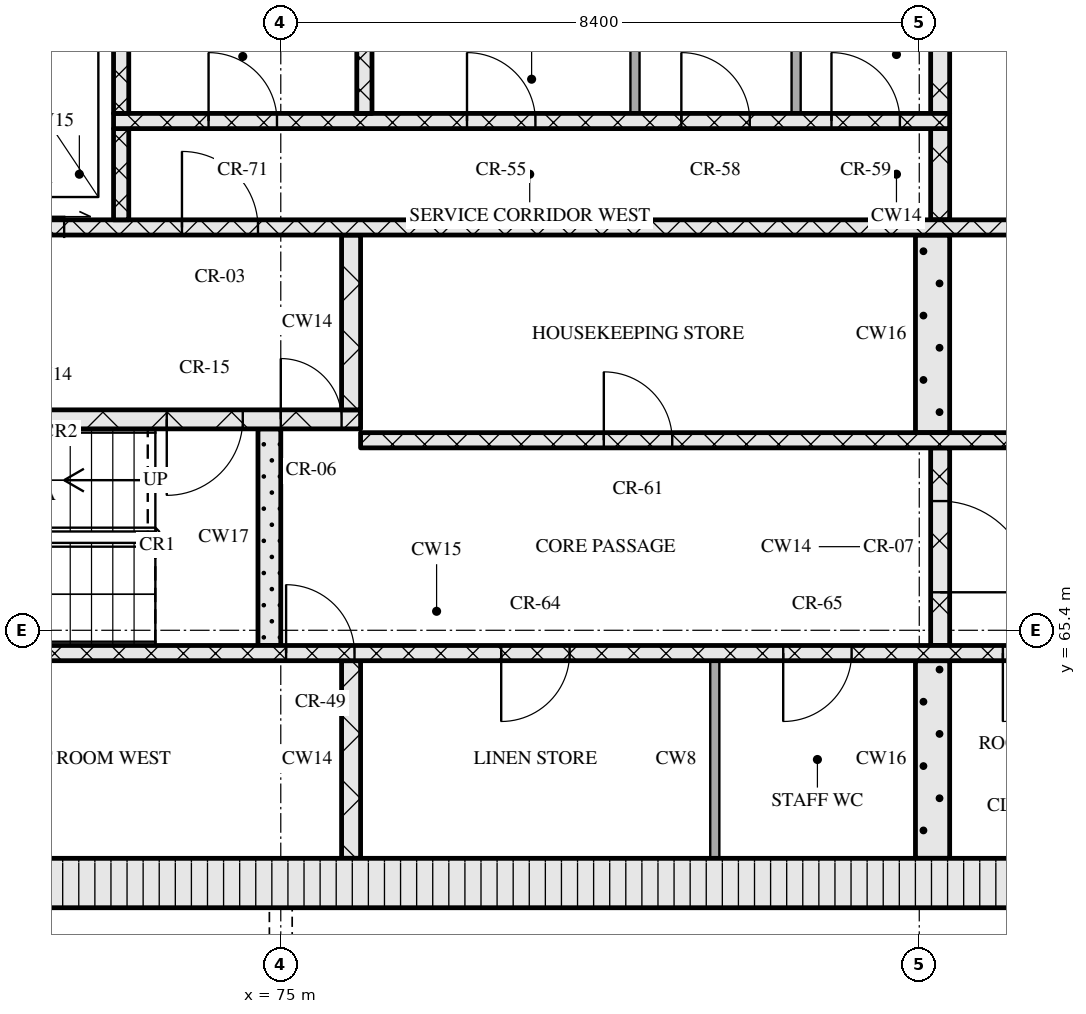
"""IFC4 building model, lengths in metres.
Left out: names, types, materials, properties, quantities, classifications, styles, units other than length and angle.
Written with IfcOpenShell. Run it as: python <this file> out.ifc"""

import sys

from ifc_helpers import new_model, si_unit, direction, frame, frame_2d, origin, place, context, subcontext, project, spatial, rectangle, extrude, element, fill, save


model = new_model("IFC4")
c1 = context("Model", 3, precision=1e-05, world=origin(), true_north=direction((0.0, 1.0)))
c2 = subcontext(c1, "Body", "Model", "MODEL_VIEW")
j1 = project(units=[si_unit("LENGTHUNIT", "METRE"), si_unit("PLANEANGLEUNIT", "RADIAN")], contexts=[c1])
p1 = place(None, origin())
s1 = spatial("IfcSite", under=j1, at=p1, CompositionType="ELEMENT")
p2 = place(p1, origin())
s2 = spatial("IfcBuilding", under=s1, at=p2, CompositionType="ELEMENT")
p3 = place(p2, frame((0.0, 0.0, 219.9)))
s3 = spatial("IfcBuildingStorey", under=s2, at=p3, CompositionType="ELEMENT", Elevation=219.9)
p4 = place(p3, frame((67.15, 62.075, 0.0), z_axis=(0.0, 0.0, 1.0), x_axis=(1.0, 0.0, 0.0)))
e1 = element("IfcWall", 1, at=p4, inside=s3, PredefinedType="SOLIDWALL", context=c2, shape_type="SweptSolid", body=[
    extrude(rectangle(XDim=40.9, YDim=0.65, at=frame_2d((20.45, 0.0))), origin(), (0.0, 0.0, 1.0), 3.32),
])
p5 = place(p4, frame((20.8, 0.0, 0.0)))
e2 = element("IfcOpeningElement", 2, at=p5, cuts=e1, PredefinedType="OPENING", context=c2, shape_type="SweptSolid", body=[
    extrude(rectangle(XDim=1.8, YDim=2.1, at=frame_2d((0.9, 1.05))), frame((0.0, 0.335, 0.0), z_axis=(0.0, -1.0, 0.0), x_axis=(1.0, 0.0, 0.0)), (0.0, 0.0, 1.0), 0.67),
])
p6 = place(p3, frame((75.925, 62.4, 0.0), z_axis=(0.0, 0.0, 1.0), x_axis=(0.0, 1.0, 0.0)))
e3 = element("IfcWall", 3, at=p6, inside=s3, PredefinedType="SOLIDWALL", context=c2, shape_type="SweptSolid", body=[
    extrude(rectangle(XDim=2.6, YDim=0.25, at=frame_2d((1.3, 0.0))), origin(), (0.0, 0.0, 1.0), 3.32),
])
p7 = place(p3, frame((80.71, 62.4, 0.0), z_axis=(0.0, 0.0, 1.0), x_axis=(0.0, 1.0, 0.0)))
e4 = element("IfcWall", 4, at=p7, inside=s3, PredefinedType="PARTITIONING", context=c2, shape_type="SweptSolid", body=[
    extrude(rectangle(XDim=2.6, YDim=0.12, at=frame_2d((1.3, 0.0))), origin(), (0.0, 0.0, 1.0), 3.32),
])
p8 = place(p3, frame((83.575, 62.4, 0.0), z_axis=(0.0, 0.0, 1.0), x_axis=(0.0, 1.0, 0.0)))
e5 = element("IfcWall", 5, at=p8, inside=s3, PredefinedType="SOLIDWALL", context=c2, shape_type="SweptSolid", body=[
    extrude(rectangle(XDim=2.6, YDim=0.45, at=frame_2d((1.3, 0.0))), origin(), (0.0, 0.0, 1.0), 3.32),
])
p9 = place(p3, frame((67.8, 65.1, 0.0), z_axis=(0.0, 0.0, 1.0), x_axis=(1.0, 0.0, 0.0)))
e6 = element("IfcWall", 6, at=p9, inside=s3, PredefinedType="SOLIDWALL", context=c2, shape_type="SweptSolid", body=[
    extrude(rectangle(XDim=18.5, YDim=0.2, at=frame_2d((9.25, 0.0))), origin(), (0.0, 0.0, 1.0), 3.32),
])
p10 = place(p9, frame((7.27, 0.0, 0.0)))
e7 = element("IfcOpeningElement", 7, at=p10, cuts=e6, PredefinedType="OPENING", context=c2, shape_type="SweptSolid", body=[
    extrude(rectangle(XDim=0.9, YDim=2.1, at=frame_2d((0.45, 1.05))), frame((0.0, 0.11, 0.0), z_axis=(0.0, -1.0, 0.0), x_axis=(1.0, 0.0, 0.0)), (0.0, 0.0, 1.0), 0.22),
])
p11 = place(p9, frame((10.1, 0.0, 0.0)))
e8 = element("IfcOpeningElement", 8, at=p11, cuts=e6, PredefinedType="OPENING", context=c2, shape_type="SweptSolid", body=[
    extrude(rectangle(XDim=0.9, YDim=2.1, at=frame_2d((0.45, 1.05))), frame((0.0, 0.11, 0.0), z_axis=(0.0, -1.0, 0.0), x_axis=(1.0, 0.0, 0.0)), (0.0, 0.0, 1.0), 0.22),
])
p12 = place(p9, frame((13.81, 0.0, 0.0)))
e9 = element("IfcOpeningElement", 9, at=p12, cuts=e6, PredefinedType="OPENING", context=c2, shape_type="SweptSolid", body=[
    extrude(rectangle(XDim=0.9, YDim=2.1, at=frame_2d((0.45, 1.05))), frame((0.0, 0.11, 0.0), z_axis=(0.0, -1.0, 0.0), x_axis=(1.0, 0.0, 0.0)), (0.0, 0.0, 1.0), 0.22),
])
p13 = place(p9, frame((16.7, 0.0, 0.0)))
e10 = element("IfcOpeningElement", 10, at=p13, cuts=e6, PredefinedType="OPENING", context=c2, shape_type="SweptSolid", body=[
    extrude(rectangle(XDim=0.9, YDim=2.1, at=frame_2d((0.45, 1.05))), frame((0.0, 0.11, 0.0), z_axis=(0.0, -1.0, 0.0), x_axis=(1.0, 0.0, 0.0)), (0.0, 0.0, 1.0), 0.22),
])
p14 = place(p3, frame((74.85, 65.2, 0.0), z_axis=(0.0, 0.0, 1.0), x_axis=(0.0, 1.0, 0.0)))
e11 = element("IfcWall", 11, at=p14, inside=s3, PredefinedType="SOLIDWALL", context=c2, shape_type="SweptSolid", body=[
    extrude(rectangle(XDim=2.85, YDim=0.3, at=frame_2d((1.425, 0.0))), origin(), (0.0, 0.0, 1.0), 3.32),
])
p15 = place(p3, frame((83.675, 65.2, 0.0), z_axis=(0.0, 0.0, 1.0), x_axis=(0.0, 1.0, 0.0)))
e12 = element("IfcWall", 12, at=p15, inside=s3, PredefinedType="SOLIDWALL", context=c2, shape_type="SweptSolid", body=[
    extrude(rectangle(XDim=2.6, YDim=0.25, at=frame_2d((1.3, 0.0))), origin(), (0.0, 0.0, 1.0), 3.32),
])
p16 = place(p15, frame((0.7, 0.0, 0.0)))
e13 = element("IfcOpeningElement", 13, at=p16, cuts=e12, PredefinedType="OPENING", context=c2, shape_type="SweptSolid", body=[
    extrude(rectangle(XDim=1.2, YDim=2.1, at=frame_2d((0.6, 1.05))), frame((0.0, 0.135, 0.0), z_axis=(0.0, -1.0, 0.0), x_axis=(1.0, 0.0, 0.0)), (0.0, 0.0, 1.0), 0.27),
])
p17 = place(p3, frame((76.05, 67.9, 0.0), z_axis=(0.0, 0.0, 1.0), x_axis=(1.0, 0.0, 0.0)))
e14 = element("IfcWall", 14, at=p17, inside=s3, PredefinedType="SOLIDWALL", context=c2, shape_type="SweptSolid", body=[
    extrude(rectangle(XDim=23.1, YDim=0.2, at=frame_2d((11.55, 0.0))), origin(), (0.0, 0.0, 1.0), 3.32),
])
p18 = place(p17, frame((3.2, 0.0, 0.0)))
e15 = element("IfcOpeningElement", 15, at=p18, cuts=e14, PredefinedType="OPENING", context=c2, shape_type="SweptSolid", body=[
    extrude(rectangle(XDim=0.9, YDim=2.1, at=frame_2d((0.45, 1.05))), frame((0.0, 0.11, 0.0), z_axis=(0.0, -1.0, 0.0), x_axis=(1.0, 0.0, 0.0)), (0.0, 0.0, 1.0), 0.22),
])
p19 = place(p17, frame((9.7, 0.0, 0.0)))
e16 = element("IfcOpeningElement", 16, at=p19, cuts=e14, PredefinedType="OPENING", context=c2, shape_type="SweptSolid", body=[
    extrude(rectangle(XDim=0.9, YDim=2.1, at=frame_2d((0.45, 1.05))), frame((0.0, 0.11, 0.0), z_axis=(0.0, -1.0, 0.0), x_axis=(1.0, 0.0, 0.0)), (0.0, 0.0, 1.0), 0.22),
])
p20 = place(p17, frame((13.55, 0.0, 0.0)))
e17 = element("IfcOpeningElement", 17, at=p20, cuts=e14, PredefinedType="OPENING", context=c2, shape_type="SweptSolid", body=[
    extrude(rectangle(XDim=1.0, YDim=2.1, at=frame_2d((0.5, 1.05))), frame((0.0, 0.11, 0.0), z_axis=(0.0, -1.0, 0.0), x_axis=(1.0, 0.0, 0.0)), (0.0, 0.0, 1.0), 0.22),
])
p21 = place(p17, frame((16.2, 0.0, 0.0)))
e18 = element("IfcOpeningElement", 18, at=p21, cuts=e14, PredefinedType="OPENING", context=c2, shape_type="SweptSolid", body=[
    extrude(rectangle(XDim=1.1, YDim=2.1, at=frame_2d((0.55, 1.05))), frame((0.0, 0.11, 0.0), z_axis=(0.0, -1.0, 0.0), x_axis=(1.0, 0.0, 0.0)), (0.0, 0.0, 1.0), 0.22),
])
p22 = place(p17, frame((18.7, 0.0, 0.0)))
e19 = element("IfcOpeningElement", 19, at=p22, cuts=e14, PredefinedType="OPENING", context=c2, shape_type="SweptSolid", body=[
    extrude(rectangle(XDim=1.1, YDim=2.1, at=frame_2d((0.55, 1.05))), frame((0.0, 0.11, 0.0), z_axis=(0.0, -1.0, 0.0), x_axis=(1.0, 0.0, 0.0)), (0.0, 0.0, 1.0), 0.22),
])
p23 = place(p17, frame((21.2, 0.0, 0.0)))
e20 = element("IfcOpeningElement", 20, at=p23, cuts=e14, PredefinedType="OPENING", context=c2, shape_type="SweptSolid", body=[
    extrude(rectangle(XDim=1.1, YDim=2.1, at=frame_2d((0.55, 1.05))), frame((0.0, 0.11, 0.0), z_axis=(0.0, -1.0, 0.0), x_axis=(1.0, 0.0, 0.0)), (0.0, 0.0, 1.0), 0.22),
])
p24 = place(p3, frame((83.575, 68.0, 0.0), z_axis=(0.0, 0.0, 1.0), x_axis=(0.0, 1.0, 0.0)))
e21 = element("IfcWall", 21, at=p24, inside=s3, PredefinedType="SOLIDWALL", context=c2, shape_type="SweptSolid", body=[
    extrude(rectangle(XDim=2.6, YDim=0.45, at=frame_2d((1.3, 0.0))), origin(), (0.0, 0.0, 1.0), 3.32),
])
p25 = place(p3, frame((67.8, 68.175, 0.0), z_axis=(0.0, 0.0, 1.0), x_axis=(1.0, 0.0, 0.0)))
e22 = element("IfcWall", 22, at=p25, inside=s3, PredefinedType="SOLIDWALL", context=c2, shape_type="SweptSolid", body=[
    extrude(rectangle(XDim=8.25, YDim=0.25, at=frame_2d((4.125, 0.0))), origin(), (0.0, 0.0, 1.0), 3.32),
])
p26 = place(p25, frame((5.7, 0.0, 0.0)))
e23 = element("IfcOpeningElement", 23, at=p26, cuts=e22, PredefinedType="OPENING", context=c2, shape_type="SweptSolid", body=[
    extrude(rectangle(XDim=1.0, YDim=2.1, at=frame_2d((0.5, 1.05))), frame((0.0, 0.135, 0.0), z_axis=(0.0, -1.0, 0.0), x_axis=(1.0, 0.0, 0.0)), (0.0, 0.0, 1.0), 0.27),
])
p27 = place(p25, frame((7.2, 0.0, 0.0)))
e24 = element("IfcOpeningElement", 24, at=p27, cuts=e22, PredefinedType="OPENING", context=c2, shape_type="SweptSolid", body=[
    extrude(rectangle(XDim=0.8, YDim=2.1, at=frame_2d((0.4, 1.05))), frame((0.0, 0.135, 0.0), z_axis=(0.0, -1.0, 0.0), x_axis=(1.0, 0.0, 0.0)), (0.0, 0.0, 1.0), 0.27),
])
p28 = place(p3, frame((75.925, 68.3, 0.0), z_axis=(0.0, 0.0, 1.0), x_axis=(0.0, 1.0, 0.0)))
e25 = element("IfcWall", 25, at=p28, inside=s3, PredefinedType="SOLIDWALL", context=c2, shape_type="SweptSolid", body=[
    extrude(rectangle(XDim=2.3, YDim=0.25, at=frame_2d((1.15, 0.0))), origin(), (0.0, 0.0, 1.0), 3.32),
])
p29 = place(p3, frame((67.8, 70.7, 0.0), z_axis=(0.0, 0.0, 1.0), x_axis=(1.0, 0.0, 0.0)))
e26 = element("IfcWall", 26, at=p29, inside=s3, PredefinedType="SOLIDWALL", context=c2, shape_type="SweptSolid", body=[
    extrude(rectangle(XDim=39.6, YDim=0.2, at=frame_2d((19.8, 0.0))), origin(), (0.0, 0.0, 1.0), 3.32),
])
p30 = place(p29, frame((0.65, 0.0, 0.0)))
e27 = element("IfcOpeningElement", 27, at=p30, cuts=e26, PredefinedType="OPENING", context=c2, shape_type="SweptSolid", body=[
    extrude(rectangle(XDim=1.1, YDim=2.1, at=frame_2d((0.55, 1.05))), frame((0.0, 0.11, 0.0), z_axis=(0.0, -1.0, 0.0), x_axis=(1.0, 0.0, 0.0)), (0.0, 0.0, 1.0), 0.22),
])
p31 = place(p29, frame((3.25, 0.0, 0.0)))
e28 = element("IfcOpeningElement", 28, at=p31, cuts=e26, PredefinedType="OPENING", context=c2, shape_type="SweptSolid", body=[
    extrude(rectangle(XDim=1.1, YDim=2.1, at=frame_2d((0.55, 1.05))), frame((0.0, 0.11, 0.0), z_axis=(0.0, -1.0, 0.0), x_axis=(1.0, 0.0, 0.0)), (0.0, 0.0, 1.0), 0.22),
])
p32 = place(p29, frame((5.9, 0.0, 0.0)))
e29 = element("IfcOpeningElement", 29, at=p32, cuts=e26, PredefinedType="OPENING", context=c2, shape_type="SweptSolid", body=[
    extrude(rectangle(XDim=1.0, YDim=2.1, at=frame_2d((0.5, 1.05))), frame((0.0, 0.11, 0.0), z_axis=(0.0, -1.0, 0.0), x_axis=(1.0, 0.0, 0.0)), (0.0, 0.0, 1.0), 0.22),
])
p33 = place(p29, frame((21.7, 0.0, 0.0)))
e30 = element("IfcOpeningElement", 30, at=p33, cuts=e26, PredefinedType="OPENING", context=c2, shape_type="SweptSolid", body=[
    extrude(rectangle(XDim=1.0, YDim=2.1, at=frame_2d((0.5, 1.05))), frame((0.0, 0.11, 0.0), z_axis=(0.0, -1.0, 0.0), x_axis=(1.0, 0.0, 0.0)), (0.0, 0.0, 1.0), 0.22),
])
p34 = place(p29, frame((32.7, 0.0, 0.0)))
e31 = element("IfcOpeningElement", 31, at=p34, cuts=e26, PredefinedType="OPENING", context=c2, shape_type="SweptSolid", body=[
    extrude(rectangle(XDim=1.0, YDim=2.1, at=frame_2d((0.5, 1.05))), frame((0.0, 0.11, 0.0), z_axis=(0.0, -1.0, 0.0), x_axis=(1.0, 0.0, 0.0)), (0.0, 0.0, 1.0), 0.22),
])
p35 = place(p29, frame((35.25, 0.0, 0.0)))
e32 = element("IfcOpeningElement", 32, at=p35, cuts=e26, PredefinedType="OPENING", context=c2, shape_type="SweptSolid", body=[
    extrude(rectangle(XDim=1.1, YDim=2.1, at=frame_2d((0.55, 1.05))), frame((0.0, 0.11, 0.0), z_axis=(0.0, -1.0, 0.0), x_axis=(1.0, 0.0, 0.0)), (0.0, 0.0, 1.0), 0.22),
])
p36 = place(p29, frame((37.85, 0.0, 0.0)))
e33 = element("IfcOpeningElement", 33, at=p36, cuts=e26, PredefinedType="OPENING", context=c2, shape_type="SweptSolid", body=[
    extrude(rectangle(XDim=1.1, YDim=2.1, at=frame_2d((0.55, 1.05))), frame((0.0, 0.11, 0.0), z_axis=(0.0, -1.0, 0.0), x_axis=(1.0, 0.0, 0.0)), (0.0, 0.0, 1.0), 0.22),
])
p37 = place(p3, frame((72.9, 70.8, 0.0), z_axis=(0.0, 0.0, 1.0), x_axis=(0.0, 1.0, 0.0)))
e34 = element("IfcWall", 34, at=p37, inside=s3, PredefinedType="SOLIDWALL", context=c2, shape_type="SweptSolid", body=[
    extrude(rectangle(XDim=1.2, YDim=0.2, at=frame_2d((0.6, 0.0))), origin(), (0.0, 0.0, 1.0), 3.32),
])
p38 = place(p3, frame((83.675, 70.8, 0.0), z_axis=(0.0, 0.0, 1.0), x_axis=(0.0, 1.0, 0.0)))
e35 = element("IfcWall", 35, at=p38, inside=s3, PredefinedType="SOLIDWALL", context=c2, shape_type="SweptSolid", body=[
    extrude(rectangle(XDim=1.2, YDim=0.25, at=frame_2d((0.6, 0.0))), origin(), (0.0, 0.0, 1.0), 3.32),
])
p39 = place(p3, frame((72.8, 72.1, 0.0), z_axis=(0.0, 0.0, 1.0), x_axis=(1.0, 0.0, 0.0)))
e36 = element("IfcWall", 36, at=p39, inside=s3, PredefinedType="SOLIDWALL", context=c2, shape_type="SweptSolid", body=[
    extrude(rectangle(XDim=11.0, YDim=0.2, at=frame_2d((5.5, 0.0))), origin(), (0.0, 0.0, 1.0), 3.32),
])
p40 = place(p39, frame((1.25, 0.0, 0.0)))
e37 = element("IfcOpeningElement", 37, at=p40, cuts=e36, PredefinedType="OPENING", context=c2, shape_type="SweptSolid", body=[
    extrude(rectangle(XDim=0.9, YDim=2.1, at=frame_2d((0.45, 1.05))), frame((0.0, 0.11, 0.0), z_axis=(0.0, -1.0, 0.0), x_axis=(1.0, 0.0, 0.0)), (0.0, 0.0, 1.0), 0.22),
])
p41 = place(p39, frame((4.65, 0.0, 0.0)))
e38 = element("IfcOpeningElement", 38, at=p41, cuts=e36, PredefinedType="OPENING", context=c2, shape_type="SweptSolid", body=[
    extrude(rectangle(XDim=0.9, YDim=2.1, at=frame_2d((0.45, 1.05))), frame((0.0, 0.11, 0.0), z_axis=(0.0, -1.0, 0.0), x_axis=(1.0, 0.0, 0.0)), (0.0, 0.0, 1.0), 0.22),
])
p42 = place(p39, frame((7.47, 0.0, 0.0)))
e39 = element("IfcOpeningElement", 39, at=p42, cuts=e36, PredefinedType="OPENING", context=c2, shape_type="SweptSolid", body=[
    extrude(rectangle(XDim=0.9, YDim=2.1, at=frame_2d((0.45, 1.05))), frame((0.0, 0.11, 0.0), z_axis=(0.0, -1.0, 0.0), x_axis=(1.0, 0.0, 0.0)), (0.0, 0.0, 1.0), 0.22),
])
p43 = place(p39, frame((9.445, 0.0, 0.0)))
e40 = element("IfcOpeningElement", 40, at=p43, cuts=e36, PredefinedType="OPENING", context=c2, shape_type="SweptSolid", body=[
    extrude(rectangle(XDim=0.9, YDim=2.1, at=frame_2d((0.45, 1.05))), frame((0.0, 0.11, 0.0), z_axis=(0.0, -1.0, 0.0), x_axis=(1.0, 0.0, 0.0)), (0.0, 0.0, 1.0), 0.22),
])
for number, where, z_axis, x_axis in (
    (41, (72.9, 72.2, 0.0), (0.0, 0.0, 1.0), (0.0, 1.0, 0.0)),
    (42, (76.1, 72.2, 0.0), (0.0, 0.0, 1.0), (0.0, 1.0, 0.0)),
):
    element("IfcWall", number, at=place(p3, frame(where, z_axis=z_axis, x_axis=x_axis)), inside=s3, PredefinedType="SOLIDWALL", context=c2, shape_type="SweptSolid", body=[
        extrude(rectangle(XDim=2.2, YDim=0.2, at=frame_2d((1.1, 0.0))), origin(), (0.0, 0.0, 1.0), 3.32),
    ])
for number, where, z_axis, x_axis in (
    (43, (79.66, 72.2, 0.0), (0.0, 0.0, 1.0), (0.0, 1.0, 0.0)),
    (44, (81.78, 72.2, 0.0), (0.0, 0.0, 1.0), (0.0, 1.0, 0.0)),
):
    element("IfcWall", number, at=place(p3, frame(where, z_axis=z_axis, x_axis=x_axis)), inside=s3, PredefinedType="PARTITIONING", context=c2, shape_type="SweptSolid", body=[
        extrude(rectangle(XDim=2.2, YDim=0.12, at=frame_2d((1.1, 0.0))), origin(), (0.0, 0.0, 1.0), 3.32),
    ])
p44 = place(p3, frame((83.675, 72.2, 0.0), z_axis=(0.0, 0.0, 1.0), x_axis=(0.0, 1.0, 0.0)))
e45 = element("IfcWall", 45, at=p44, inside=s3, PredefinedType="SOLIDWALL", context=c2, shape_type="SweptSolid", body=[
    extrude(rectangle(XDim=1.55, YDim=0.25, at=frame_2d((0.775, 0.0))), origin(), (0.0, 0.0, 1.0), 3.32),
])
p45 = place(p10, origin())
e46 = element("IfcDoor", 46, at=p45, inside=s3, OperationType="SINGLE_SWING_LEFT", PredefinedType="DOOR", context=c2, shape_type="SweptSolid", body=[
    extrude(rectangle(XDim=0.9, YDim=2.1, at=frame_2d((0.45, 1.05))), frame((0.0, 0.025, 0.0), z_axis=(0.0, -1.0, 0.0), x_axis=(1.0, 0.0, 0.0)), (0.0, 0.0, 1.0), 0.05),
])
fill(e7, e46)
p46 = place(p11, origin())
e47 = element("IfcDoor", 47, at=p46, inside=s3, OperationType="SINGLE_SWING_RIGHT", PredefinedType="DOOR", context=c2, shape_type="SweptSolid", body=[
    extrude(rectangle(XDim=0.9, YDim=2.1, at=frame_2d((0.45, 1.05))), frame((0.0, 0.025, 0.0), z_axis=(0.0, -1.0, 0.0), x_axis=(1.0, 0.0, 0.0)), (0.0, 0.0, 1.0), 0.05),
])
fill(e8, e47)
p47 = place(p12, origin())
e48 = element("IfcDoor", 48, at=p47, inside=s3, OperationType="SINGLE_SWING_RIGHT", PredefinedType="DOOR", context=c2, shape_type="SweptSolid", body=[
    extrude(rectangle(XDim=0.9, YDim=2.1, at=frame_2d((0.45, 1.05))), frame((0.0, 0.025, 0.0), z_axis=(0.0, -1.0, 0.0), x_axis=(1.0, 0.0, 0.0)), (0.0, 0.0, 1.0), 0.05),
])
fill(e9, e48)
p48 = place(p13, origin())
e49 = element("IfcDoor", 49, at=p48, inside=s3, OperationType="SINGLE_SWING_RIGHT", PredefinedType="DOOR", context=c2, shape_type="SweptSolid", body=[
    extrude(rectangle(XDim=0.9, YDim=2.1, at=frame_2d((0.45, 1.05))), frame((0.0, 0.025, 0.0), z_axis=(0.0, -1.0, 0.0), x_axis=(1.0, 0.0, 0.0)), (0.0, 0.0, 1.0), 0.05),
])
fill(e10, e49)
p49 = place(p16, origin())
e50 = element("IfcDoor", 50, at=p49, inside=s3, OperationType="SINGLE_SWING_RIGHT", PredefinedType="DOOR", context=c2, shape_type="SweptSolid", body=[
    extrude(rectangle(XDim=1.2, YDim=2.1, at=frame_2d((0.6, 1.05))), frame((0.0, 0.025, 0.0), z_axis=(0.0, -1.0, 0.0), x_axis=(1.0, 0.0, 0.0)), (0.0, 0.0, 1.0), 0.05),
])
fill(e13, e50)
p50 = place(p18, origin())
e51 = element("IfcDoor", 51, at=p50, inside=s3, OperationType="SINGLE_SWING_LEFT", PredefinedType="DOOR", context=c2, shape_type="SweptSolid", body=[
    extrude(rectangle(XDim=0.9, YDim=2.1, at=frame_2d((0.45, 1.05))), frame((0.0, 0.025, 0.0), z_axis=(0.0, -1.0, 0.0), x_axis=(1.0, 0.0, 0.0)), (0.0, 0.0, 1.0), 0.05),
])
fill(e15, e51)
p51 = place(p26, origin())
e52 = element("IfcDoor", 52, at=p51, inside=s3, OperationType="SINGLE_SWING_RIGHT", PredefinedType="DOOR", context=c2, shape_type="SweptSolid", body=[
    extrude(rectangle(XDim=1.0, YDim=2.1, at=frame_2d((0.5, 1.05))), frame((0.0, 0.025, 0.0), z_axis=(0.0, -1.0, 0.0), x_axis=(1.0, 0.0, 0.0)), (0.0, 0.0, 1.0), 0.05),
])
fill(e23, e52)
p52 = place(p27, origin())
e53 = element("IfcDoor", 53, at=p52, inside=s3, OperationType="SINGLE_SWING_LEFT", PredefinedType="DOOR", context=c2, shape_type="SweptSolid", body=[
    extrude(rectangle(XDim=0.8, YDim=2.1, at=frame_2d((0.4, 1.05))), frame((0.0, 0.025, 0.0), z_axis=(0.0, -1.0, 0.0), x_axis=(1.0, 0.0, 0.0)), (0.0, 0.0, 1.0), 0.05),
])
fill(e24, e53)
p53 = place(p31, origin())
e54 = element("IfcDoor", 54, at=p53, inside=s3, OperationType="SLIDING_TO_RIGHT", PredefinedType="DOOR", context=c2, shape_type="SweptSolid", body=[
    extrude(rectangle(XDim=1.1, YDim=2.1, at=frame_2d((0.55, 1.05))), frame((0.0, 0.025, 0.0), z_axis=(0.0, -1.0, 0.0), x_axis=(1.0, 0.0, 0.0)), (0.0, 0.0, 1.0), 0.05),
])
fill(e28, e54)
p54 = place(p32, origin())
e55 = element("IfcDoor", 55, at=p54, inside=s3, OperationType="SINGLE_SWING_LEFT", PredefinedType="DOOR", context=c2, shape_type="SweptSolid", body=[
    extrude(rectangle(XDim=1.0, YDim=2.1, at=frame_2d((0.5, 1.05))), frame((0.0, 0.025, 0.0), z_axis=(0.0, -1.0, 0.0), x_axis=(1.0, 0.0, 0.0)), (0.0, 0.0, 1.0), 0.05),
])
fill(e29, e55)
p55 = place(p40, origin())
e56 = element("IfcDoor", 56, at=p55, inside=s3, OperationType="SINGLE_SWING_LEFT", PredefinedType="DOOR", context=c2, shape_type="SweptSolid", body=[
    extrude(rectangle(XDim=0.9, YDim=2.1, at=frame_2d((0.45, 1.05))), frame((0.0, 0.025, 0.0), z_axis=(0.0, -1.0, 0.0), x_axis=(1.0, 0.0, 0.0)), (0.0, 0.0, 1.0), 0.05),
])
fill(e37, e56)
p56 = place(p41, origin())
e57 = element("IfcDoor", 57, at=p56, inside=s3, OperationType="SINGLE_SWING_LEFT", PredefinedType="DOOR", context=c2, shape_type="SweptSolid", body=[
    extrude(rectangle(XDim=0.9, YDim=2.1, at=frame_2d((0.45, 1.05))), frame((0.0, 0.025, 0.0), z_axis=(0.0, -1.0, 0.0), x_axis=(1.0, 0.0, 0.0)), (0.0, 0.0, 1.0), 0.05),
])
fill(e38, e57)
p57 = place(p42, origin())
e58 = element("IfcDoor", 58, at=p57, inside=s3, OperationType="SINGLE_SWING_LEFT", PredefinedType="DOOR", context=c2, shape_type="SweptSolid", body=[
    extrude(rectangle(XDim=0.9, YDim=2.1, at=frame_2d((0.45, 1.05))), frame((0.0, 0.025, 0.0), z_axis=(0.0, -1.0, 0.0), x_axis=(1.0, 0.0, 0.0)), (0.0, 0.0, 1.0), 0.05),
])
fill(e39, e58)
p58 = place(p43, origin())
e59 = element("IfcDoor", 59, at=p58, inside=s3, OperationType="SINGLE_SWING_LEFT", PredefinedType="DOOR", context=c2, shape_type="SweptSolid", body=[
    extrude(rectangle(XDim=0.9, YDim=2.1, at=frame_2d((0.45, 1.05))), frame((0.0, 0.025, 0.0), z_axis=(0.0, -1.0, 0.0), x_axis=(1.0, 0.0, 0.0)), (0.0, 0.0, 1.0), 0.05),
])
fill(e40, e59)
save(model, sys.argv[1])
